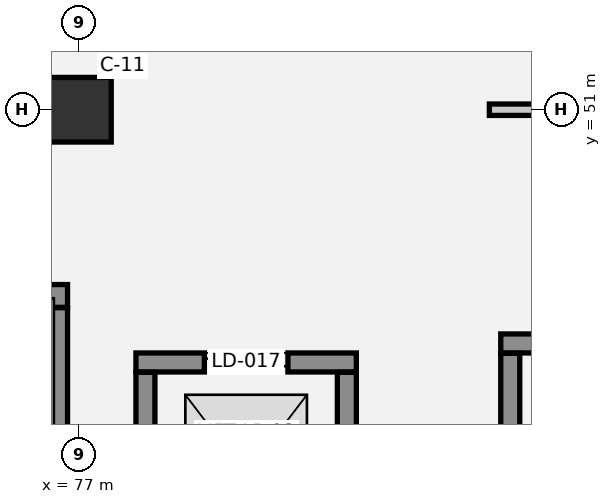
"""IFC4 building model, lengths in metres.
Left out: names, types, materials, properties, quantities, classifications, styles, units other than length and angle.
Written with IfcOpenShell. Run it as: python <this file> out.ifc"""

import sys

from ifc_helpers import new_model, si_unit, direction, frame, frame_2d, origin, origin_2d, place, context, subcontext, project, spatial, rectangle, extrude, element, fill, save


model = new_model("IFC4")
c1 = context("Model", 3, precision=1e-05, world=origin(), true_north=direction((0.0, 1.0)))
c2 = subcontext(c1, "Body", "Model", "MODEL_VIEW")
j1 = project(units=[si_unit("LENGTHUNIT", "METRE"), si_unit("PLANEANGLEUNIT", "RADIAN")], contexts=[c1])
p1 = place(None, origin())
s1 = spatial("IfcSite", under=j1, at=p1, CompositionType="ELEMENT")
p2 = place(p1, origin())
s2 = spatial("IfcBuilding", under=s1, at=p2, CompositionType="ELEMENT")
p3 = place(p2, frame((0.0, 0.0, -4.5)))
s3 = spatial("IfcBuildingStorey", under=s2, at=p3, CompositionType="ELEMENT", Elevation=-4.5)
p4 = place(p3, frame((77.0, 51.0, 0.0), z_axis=(0.0, 0.0, 1.0), x_axis=(1.0, 0.0, 0.0)))
e1 = element("IfcColumn", 1, at=p4, inside=s3, PredefinedType="COLUMN", context=c2, shape_type="SweptSolid", body=[
    extrude(rectangle(XDim=0.85, YDim=0.85, at=origin_2d()), origin(), (0.0, 0.0, 1.0), 4.5),
])
p5 = place(p3, frame((80.65, 47.675, 0.0), z_axis=(0.0, 0.0, 1.0), x_axis=(-1.0, 0.0, 0.0)))
e2 = element("IfcWall", 2, at=p5, inside=s3, PredefinedType="SHEAR", context=c2, shape_type="SweptSolid", body=[
    extrude(rectangle(XDim=2.9, YDim=0.25, at=frame_2d((1.45, 0.0))), origin(), (0.0, 0.0, 1.0), 4.5),
])
p6 = place(p5, frame((0.9, 0.0, 0.0)))
e3 = element("IfcOpeningElement", 3, at=p6, cuts=e2, PredefinedType="OPENING", context=c2, shape_type="SweptSolid", body=[
    extrude(rectangle(XDim=1.1, YDim=2.15, at=frame_2d((0.55, 1.075))), frame((0.0, 0.135, 0.0), z_axis=(0.0, -1.0, 0.0), x_axis=(1.0, 0.0, 0.0)), (0.0, 0.0, 1.0), 0.27),
])
for number, where, z_axis, x_axis in (
    (4, (77.875, 47.545, 0.0), (0.0, 0.0, 1.0), (0.0, -1.0, 0.0)),
    (5, (80.525, 44.855, 0.0), (0.0, 0.0, 1.0), (0.0, 1.0, 0.0)),
):
    element("IfcWall", number, at=place(p3, frame(where, z_axis=z_axis, x_axis=x_axis)), inside=s3, PredefinedType="SHEAR", context=c2, shape_type="SweptSolid", body=[
        extrude(rectangle(XDim=2.69, YDim=0.25, at=frame_2d((1.345, 0.0))), origin(), (0.0, 0.0, 1.0), 4.5),
    ])
p7 = place(p3, frame((85.45, 47.925, 0.0), z_axis=(0.0, 0.0, 1.0), x_axis=(-1.0, 0.0, 0.0)))
e6 = element("IfcWall", 6, at=p7, inside=s3, PredefinedType="SHEAR", context=c2, shape_type="SweptSolid", body=[
    extrude(rectangle(XDim=2.9, YDim=0.25, at=frame_2d((1.45, 0.0))), origin(), (0.0, 0.0, 1.0), 4.5),
])
p8 = place(p3, frame((82.675, 47.795, 0.0), z_axis=(0.0, 0.0, 1.0), x_axis=(0.0, -1.0, 0.0)))
e7 = element("IfcWall", 7, at=p8, inside=s3, PredefinedType="SHEAR", context=c2, shape_type="SweptSolid", body=[
    extrude(rectangle(XDim=2.79, YDim=0.25, at=frame_2d((1.395, 0.0))), origin(), (0.0, 0.0, 1.0), 4.5),
])
p9 = place(p3, frame((76.85, 48.55, 0.0), z_axis=(0.0, 0.0, 1.0), x_axis=(-1.0, 0.0, 0.0)))
e8 = element("IfcWall", 8, at=p9, inside=s3, PredefinedType="SHEAR", context=c2, shape_type="SweptSolid", body=[
    extrude(rectangle(XDim=7.7, YDim=0.3, at=frame_2d((3.85, 0.0))), origin(), (0.0, 0.0, 1.0), 4.2),
])
p10 = place(p9, frame((6.025, 0.0, 0.0)))
e9 = element("IfcOpeningElement", 9, at=p10, cuts=e8, PredefinedType="OPENING", context=c2, shape_type="SweptSolid", body=[
    extrude(rectangle(XDim=1.25, YDim=2.15, at=frame_2d((0.625, 1.075))), frame((0.0, 0.16, 0.0), z_axis=(0.0, -1.0, 0.0), x_axis=(1.0, 0.0, 0.0)), (0.0, 0.0, 1.0), 0.32),
])
p11 = place(p3, frame((76.7, 44.205, 0.0), z_axis=(0.0, 0.0, 1.0), x_axis=(0.0, 1.0, 0.0)))
e10 = element("IfcWall", 10, at=p11, inside=s3, PredefinedType="SHEAR", context=c2, shape_type="SweptSolid", body=[
    extrude(rectangle(XDim=4.19, YDim=0.3, at=frame_2d((2.095, 0.0))), origin(), (0.0, 0.0, 1.0), 4.2),
])
p12 = place(p3, frame((62.08, 51.0, 0.0), z_axis=(0.0, 0.0, 1.0), x_axis=(1.0, 0.0, 0.0)))
e11 = element("IfcWall", 11, at=p12, inside=s3, PredefinedType="PARTITIONING", context=c2, shape_type="SweptSolid", body=[
    extrude(rectangle(XDim=15.12, YDim=0.15, at=frame_2d((7.56, 0.0))), origin(), (0.0, 0.0, 1.0), 3.4),
])
p13 = place(p12, frame((8.943, 0.0, 0.0)))
e12 = element("IfcOpeningElement", 12, at=p13, cuts=e11, PredefinedType="OPENING", context=c2, shape_type="SweptSolid", body=[
    extrude(rectangle(XDim=1.2, YDim=2.15, at=frame_2d((0.6, 1.075))), frame((0.0, 0.085, 0.0), z_axis=(0.0, -1.0, 0.0), x_axis=(1.0, 0.0, 0.0)), (0.0, 0.0, 1.0), 0.17),
])
p14 = place(p3, frame((82.4, 51.0, 0.0), z_axis=(0.0, 0.0, 1.0), x_axis=(1.0, 0.0, 0.0)))
e13 = element("IfcWall", 13, at=p14, inside=s3, PredefinedType="PARTITIONING", context=c2, shape_type="SweptSolid", body=[
    extrude(rectangle(XDim=5.35, YDim=0.15, at=frame_2d((2.675, 0.0))), origin(), (0.0, 0.0, 1.0), 3.4),
])
p15 = place(p6, origin())
e14 = element("IfcDoor", 14, at=p15, inside=s3, OperationType="DOUBLE_DOOR_SLIDING", PredefinedType="DOOR", context=c2, shape_type="SweptSolid", body=[
    extrude(rectangle(XDim=1.1, YDim=2.15, at=frame_2d((0.55, 1.075))), frame((0.0, 0.025, 0.0), z_axis=(0.0, -1.0, 0.0), x_axis=(1.0, 0.0, 0.0)), (0.0, 0.0, 1.0), 0.05),
])
fill(e3, e14)
save(model, sys.argv[1])
